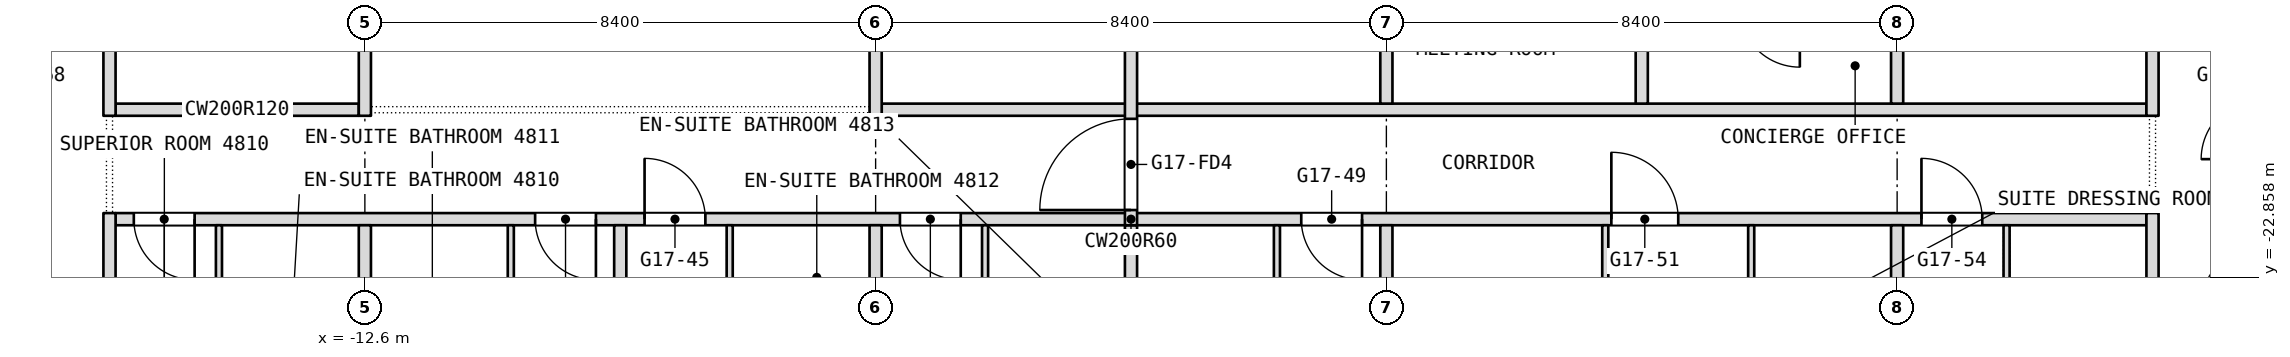
"""IFC4 building model, lengths in metres.
Left out: names, types, materials, properties, quantities, classifications, styles, units other than length and angle.
Written with IfcOpenShell. Run it as: python <this file> out.ifc"""

import sys

from ifc_helpers import new_model, si_unit, direction, frame, frame_2d, origin, place, context, subcontext, project, spatial, rectangle, extrude, element, fill, save


model = new_model("IFC4")
c1 = context("Model", 3, precision=1e-05, world=origin(), true_north=direction((0.0, 1.0)))
c2 = subcontext(c1, "Body", "Model", "MODEL_VIEW")
j1 = project(units=[si_unit("LENGTHUNIT", "METRE"), si_unit("PLANEANGLEUNIT", "RADIAN")], contexts=[c1])
p1 = place(None, origin())
s1 = spatial("IfcSite", under=j1, at=p1, CompositionType="ELEMENT")
p2 = place(p1, origin())
s2 = spatial("IfcBuilding", under=s1, at=p2, CompositionType="ELEMENT")
p3 = place(p2, frame((0.0, 0.0, 209.3)))
s3 = spatial("IfcBuildingStorey", under=s2, at=p3, CompositionType="ELEMENT", Elevation=209.3)
p4 = place(p3, frame((-16.7, -21.9, 0.0), z_axis=(0.0, 0.0, 1.0), x_axis=(1.0, 0.0, 0.0)))
e1 = element("IfcWall", 1, at=p4, inside=s3, PredefinedType="PARTITIONING", context=c2, shape_type="SweptSolid", body=[
    extrude(rectangle(XDim=33.4, YDim=0.2, at=frame_2d((16.7, 0.0))), origin(), (0.0, 0.0, 1.0), 3.34),
])
p5 = place(p4, frame((0.3, 0.0, 0.0)))
e2 = element("IfcOpeningElement", 2, at=p5, cuts=e1, PredefinedType="OPENING", context=c2, shape_type="SweptSolid", body=[
    extrude(rectangle(XDim=1.0, YDim=2.1, at=frame_2d((0.5, 1.05))), frame((0.0, 0.1, 0.0), z_axis=(0.0, -1.0, 0.0), x_axis=(1.0, 0.0, 0.0)), (0.0, 0.0, 1.0), 0.2),
])
p6 = place(p4, frame((6.9, 0.0, 0.0)))
e3 = element("IfcOpeningElement", 3, at=p6, cuts=e1, PredefinedType="OPENING", context=c2, shape_type="SweptSolid", body=[
    extrude(rectangle(XDim=1.0, YDim=2.1, at=frame_2d((0.5, 1.05))), frame((0.0, 0.1, 0.0), z_axis=(0.0, -1.0, 0.0), x_axis=(1.0, 0.0, 0.0)), (0.0, 0.0, 1.0), 0.2),
])
p7 = place(p4, frame((8.7, 0.0, 0.0)))
e4 = element("IfcOpeningElement", 4, at=p7, cuts=e1, PredefinedType="OPENING", context=c2, shape_type="SweptSolid", body=[
    extrude(rectangle(XDim=1.0, YDim=2.1, at=frame_2d((0.5, 1.05))), frame((0.0, 0.1, 0.0), z_axis=(0.0, -1.0, 0.0), x_axis=(1.0, 0.0, 0.0)), (0.0, 0.0, 1.0), 0.2),
])
p8 = place(p4, frame((12.9, 0.0, 0.0)))
e5 = element("IfcOpeningElement", 5, at=p8, cuts=e1, PredefinedType="OPENING", context=c2, shape_type="SweptSolid", body=[
    extrude(rectangle(XDim=1.0, YDim=2.1, at=frame_2d((0.5, 1.05))), frame((0.0, 0.1, 0.0), z_axis=(0.0, -1.0, 0.0), x_axis=(1.0, 0.0, 0.0)), (0.0, 0.0, 1.0), 0.2),
])
p9 = place(p4, frame((19.5, 0.0, 0.0)))
e6 = element("IfcOpeningElement", 6, at=p9, cuts=e1, PredefinedType="OPENING", context=c2, shape_type="SweptSolid", body=[
    extrude(rectangle(XDim=1.0, YDim=2.1, at=frame_2d((0.5, 1.05))), frame((0.0, 0.1, 0.0), z_axis=(0.0, -1.0, 0.0), x_axis=(1.0, 0.0, 0.0)), (0.0, 0.0, 1.0), 0.2),
])
p10 = place(p4, frame((24.6, 0.0, 0.0)))
e7 = element("IfcOpeningElement", 7, at=p10, cuts=e1, PredefinedType="OPENING", context=c2, shape_type="SweptSolid", body=[
    extrude(rectangle(XDim=1.1, YDim=2.1, at=frame_2d((0.55, 1.05))), frame((0.0, 0.1, 0.0), z_axis=(0.0, -1.0, 0.0), x_axis=(1.0, 0.0, 0.0)), (0.0, 0.0, 1.0), 0.2),
])
p11 = place(p4, frame((29.7, 0.0, 0.0)))
e8 = element("IfcOpeningElement", 8, at=p11, cuts=e1, PredefinedType="OPENING", context=c2, shape_type="SweptSolid", body=[
    extrude(rectangle(XDim=1.0, YDim=2.1, at=frame_2d((0.5, 1.05))), frame((0.0, 0.1, 0.0), z_axis=(0.0, -1.0, 0.0), x_axis=(1.0, 0.0, 0.0)), (0.0, 0.0, 1.0), 0.2),
])
p12 = place(p3, frame((-16.7, -20.1, 0.0), z_axis=(0.0, 0.0, 1.0), x_axis=(1.0, 0.0, 0.0)))
e9 = element("IfcWall", 9, at=p12, inside=s3, PredefinedType="PARTITIONING", context=c2, shape_type="SweptSolid", body=[
    extrude(rectangle(XDim=4.0, YDim=0.2, at=frame_2d((2.0, 0.0))), origin(), (0.0, 0.0, 1.0), 3.34),
])
p13 = place(p3, frame((-4.1, -20.1, 0.0), z_axis=(0.0, 0.0, 1.0), x_axis=(1.0, 0.0, 0.0)))
e10 = element("IfcWall", 10, at=p13, inside=s3, PredefinedType="PARTITIONING", context=c2, shape_type="SweptSolid", body=[
    extrude(rectangle(XDim=20.8, YDim=0.2, at=frame_2d((10.4, 0.0))), origin(), (0.0, 0.0, 1.0), 3.34),
])
p14 = place(p3, frame((16.8, -27.229, 0.0), z_axis=(0.0, 0.0, 1.0), x_axis=(0.0, 1.0, 0.0)))
e11 = element("IfcWall", 11, at=p14, inside=s3, PredefinedType="PARTITIONING", context=c2, shape_type="SweptSolid", body=[
    extrude(rectangle(XDim=5.429, YDim=0.2, at=frame_2d((2.714, 0.0))), origin(), (0.0, 0.0, 1.0), 3.34),
])
p15 = place(p3, frame((16.8, -20.2, 0.0), z_axis=(0.0, 0.0, 1.0), x_axis=(0.0, 1.0, 0.0)))
e12 = element("IfcWall", 12, at=p15, inside=s3, PredefinedType="PARTITIONING", context=c2, shape_type="SweptSolid", body=[
    extrude(rectangle(XDim=6.8, YDim=0.2, at=frame_2d((3.4, 0.0))), origin(), (0.0, 0.0, 1.0), 3.34),
])
p16 = place(p3, frame((14.4, -25.85, 0.0), z_axis=(0.0, 0.0, 1.0), x_axis=(0.0, 1.0, 0.0)))
e13 = element("IfcWall", 13, at=p16, inside=s3, PredefinedType="PARTITIONING", context=c2, shape_type="SweptSolid", body=[
    extrude(rectangle(XDim=3.85, YDim=0.1, at=frame_2d((1.925, 0.0))), origin(), (0.0, 0.0, 1.0), 3.34),
])
p17 = place(p3, frame((12.6, -28.343, 0.0), z_axis=(0.0, 0.0, 1.0), x_axis=(0.0, 1.0, 0.0)))
e14 = element("IfcWall", 14, at=p17, inside=s3, PredefinedType="PARTITIONING", context=c2, shape_type="SweptSolid", body=[
    extrude(rectangle(XDim=6.343, YDim=0.2, at=frame_2d((3.171, 0.0))), origin(), (0.0, 0.0, 1.0), 3.34),
])
p18 = place(p3, frame((12.6, -20.0, 0.0), z_axis=(0.0, 0.0, 1.0), x_axis=(0.0, 1.0, 0.0)))
e15 = element("IfcWall", 15, at=p18, inside=s3, PredefinedType="PARTITIONING", context=c2, shape_type="SweptSolid", body=[
    extrude(rectangle(XDim=1.5, YDim=0.2, at=frame_2d((0.75, 0.0))), origin(), (0.0, 0.0, 1.0), 3.34),
])
p19 = place(p3, frame((10.2, -25.55, 0.0), z_axis=(0.0, 0.0, 1.0), x_axis=(0.0, 1.0, 0.0)))
e16 = element("IfcWall", 16, at=p19, inside=s3, PredefinedType="PARTITIONING", context=c2, shape_type="SweptSolid", body=[
    extrude(rectangle(XDim=3.55, YDim=0.1, at=frame_2d((1.775, 0.0))), origin(), (0.0, 0.0, 1.0), 3.34),
])
p20 = place(p3, frame((8.4, -20.0, 0.0), z_axis=(0.0, 0.0, 1.0), x_axis=(0.0, 1.0, 0.0)))
e17 = element("IfcWall", 17, at=p20, inside=s3, PredefinedType="PARTITIONING", context=c2, shape_type="SweptSolid", body=[
    extrude(rectangle(XDim=1.5, YDim=0.2, at=frame_2d((0.75, 0.0))), origin(), (0.0, 0.0, 1.0), 3.34),
])
p21 = place(p3, frame((7.8, -25.45, 0.0), z_axis=(0.0, 0.0, 1.0), x_axis=(0.0, 1.0, 0.0)))
e18 = element("IfcWall", 18, at=p21, inside=s3, PredefinedType="PARTITIONING", context=c2, shape_type="SweptSolid", body=[
    extrude(rectangle(XDim=3.45, YDim=0.1, at=frame_2d((1.725, 0.0))), origin(), (0.0, 0.0, 1.0), 3.34),
])
p22 = place(p3, frame((4.2, -28.9, 0.0), z_axis=(0.0, 0.0, 1.0), x_axis=(0.0, 1.0, 0.0)))
e19 = element("IfcWall", 19, at=p22, inside=s3, PredefinedType="PARTITIONING", context=c2, shape_type="SweptSolid", body=[
    extrude(rectangle(XDim=6.9, YDim=0.2, at=frame_2d((3.45, 0.0))), origin(), (0.0, 0.0, 1.0), 3.34),
])
p23 = place(p3, frame((4.2, -20.0, 0.0), z_axis=(0.0, 0.0, 1.0), x_axis=(0.0, 1.0, 0.0)))
e20 = element("IfcWall", 20, at=p23, inside=s3, PredefinedType="PARTITIONING", context=c2, shape_type="SweptSolid", body=[
    extrude(rectangle(XDim=6.4, YDim=0.2, at=frame_2d((3.2, 0.0))), origin(), (0.0, 0.0, 1.0), 3.34),
])
p24 = place(p3, frame((2.4, -25.75, 0.0), z_axis=(0.0, 0.0, 1.0), x_axis=(0.0, 1.0, 0.0)))
e21 = element("IfcWall", 21, at=p24, inside=s3, PredefinedType="PARTITIONING", context=c2, shape_type="SweptSolid", body=[
    extrude(rectangle(XDim=3.75, YDim=0.1, at=frame_2d((1.875, 0.0))), origin(), (0.0, 0.0, 1.0), 3.34),
])
p25 = place(p3, frame((0.0, -28.9, 0.0), z_axis=(0.0, 0.0, 1.0), x_axis=(0.0, 1.0, 0.0)))
e22 = element("IfcWall", 22, at=p25, inside=s3, PredefinedType="PARTITIONING", context=c2, shape_type="SweptSolid", body=[
    extrude(rectangle(XDim=6.9, YDim=0.2, at=frame_2d((3.45, 0.0))), origin(), (0.0, 0.0, 1.0), 3.34),
])
p26 = place(p3, frame((0.0, -22.0, 0.0), z_axis=(0.0, 0.0, 1.0), x_axis=(0.0, 1.0, 0.0)))
e23 = element("IfcWall", 23, at=p26, inside=s3, PredefinedType="PARTITIONING", context=c2, shape_type="SweptSolid", body=[
    extrude(rectangle(XDim=8.4, YDim=0.2, at=frame_2d((4.2, 0.0))), origin(), (0.0, 0.0, 1.0), 3.34),
])
p27 = place(p26, frame((0.25, 0.0, 0.0)))
e24 = element("IfcOpeningElement", 24, at=p27, cuts=e23, PredefinedType="OPENING", context=c2, shape_type="SweptSolid", body=[
    extrude(rectangle(XDim=1.5, YDim=2.1, at=frame_2d((0.75, 1.05))), frame((0.0, 0.1, 0.0), z_axis=(0.0, -1.0, 0.0), x_axis=(1.0, 0.0, 0.0)), (0.0, 0.0, 1.0), 0.2),
])
p28 = place(p3, frame((-2.4, -25.35, 0.0), z_axis=(0.0, 0.0, 1.0), x_axis=(0.0, 1.0, 0.0)))
e25 = element("IfcWall", 25, at=p28, inside=s3, PredefinedType="PARTITIONING", context=c2, shape_type="SweptSolid", body=[
    extrude(rectangle(XDim=3.35, YDim=0.1, at=frame_2d((1.675, 0.0))), origin(), (0.0, 0.0, 1.0), 3.34),
])
p29 = place(p3, frame((-4.2, -28.9, 0.0), z_axis=(0.0, 0.0, 1.0), x_axis=(0.0, 1.0, 0.0)))
e26 = element("IfcWall", 26, at=p29, inside=s3, PredefinedType="PARTITIONING", context=c2, shape_type="SweptSolid", body=[
    extrude(rectangle(XDim=6.9, YDim=0.2, at=frame_2d((3.45, 0.0))), origin(), (0.0, 0.0, 1.0), 3.34),
])
p30 = place(p3, frame((-4.2, -20.2, 0.0), z_axis=(0.0, 0.0, 1.0), x_axis=(0.0, 1.0, 0.0)))
e27 = element("IfcWall", 27, at=p30, inside=s3, PredefinedType="PARTITIONING", context=c2, shape_type="SweptSolid", body=[
    extrude(rectangle(XDim=6.6, YDim=0.2, at=frame_2d((3.3, 0.0))), origin(), (0.0, 0.0, 1.0), 3.34),
])
p31 = place(p3, frame((-6.6, -24.75, 0.0), z_axis=(0.0, 0.0, 1.0), x_axis=(0.0, 1.0, 0.0)))
e28 = element("IfcWall", 28, at=p31, inside=s3, PredefinedType="PARTITIONING", context=c2, shape_type="SweptSolid", body=[
    extrude(rectangle(XDim=2.75, YDim=0.1, at=frame_2d((1.375, 0.0))), origin(), (0.0, 0.0, 1.0), 3.34),
])
p32 = place(p3, frame((-8.4, -28.9, 0.0), z_axis=(0.0, 0.0, 1.0), x_axis=(0.0, 1.0, 0.0)))
e29 = element("IfcWall", 29, at=p32, inside=s3, PredefinedType="PARTITIONING", context=c2, shape_type="SweptSolid", body=[
    extrude(rectangle(XDim=6.9, YDim=0.2, at=frame_2d((3.45, 0.0))), origin(), (0.0, 0.0, 1.0), 3.34),
])
p33 = place(p3, frame((-10.2, -24.85, 0.0), z_axis=(0.0, 0.0, 1.0), x_axis=(0.0, 1.0, 0.0)))
e30 = element("IfcWall", 30, at=p33, inside=s3, PredefinedType="PARTITIONING", context=c2, shape_type="SweptSolid", body=[
    extrude(rectangle(XDim=2.85, YDim=0.1, at=frame_2d((1.425, 0.0))), origin(), (0.0, 0.0, 1.0), 3.34),
])
p34 = place(p3, frame((-12.6, -28.343, 0.0), z_axis=(0.0, 0.0, 1.0), x_axis=(0.0, 1.0, 0.0)))
e31 = element("IfcWall", 31, at=p34, inside=s3, PredefinedType="PARTITIONING", context=c2, shape_type="SweptSolid", body=[
    extrude(rectangle(XDim=6.343, YDim=0.2, at=frame_2d((3.171, 0.0))), origin(), (0.0, 0.0, 1.0), 3.34),
])
p35 = place(p3, frame((-12.6, -20.2, 0.0), z_axis=(0.0, 0.0, 1.0), x_axis=(0.0, 1.0, 0.0)))
e32 = element("IfcWall", 32, at=p35, inside=s3, PredefinedType="PARTITIONING", context=c2, shape_type="SweptSolid", body=[
    extrude(rectangle(XDim=6.8, YDim=0.2, at=frame_2d((3.4, 0.0))), origin(), (0.0, 0.0, 1.0), 3.34),
])
p36 = place(p3, frame((-15.0, -25.85, 0.0), z_axis=(0.0, 0.0, 1.0), x_axis=(0.0, 1.0, 0.0)))
e33 = element("IfcWall", 33, at=p36, inside=s3, PredefinedType="PARTITIONING", context=c2, shape_type="SweptSolid", body=[
    extrude(rectangle(XDim=3.85, YDim=0.1, at=frame_2d((1.925, 0.0))), origin(), (0.0, 0.0, 1.0), 3.34),
])
p37 = place(p3, frame((-16.8, -27.229, 0.0), z_axis=(0.0, 0.0, 1.0), x_axis=(0.0, 1.0, 0.0)))
e34 = element("IfcWall", 34, at=p37, inside=s3, PredefinedType="PARTITIONING", context=c2, shape_type="SweptSolid", body=[
    extrude(rectangle(XDim=5.429, YDim=0.2, at=frame_2d((2.714, 0.0))), origin(), (0.0, 0.0, 1.0), 3.34),
])
p38 = place(p3, frame((-16.8, -20.2, 0.0), z_axis=(0.0, 0.0, 1.0), x_axis=(0.0, 1.0, 0.0)))
e35 = element("IfcWall", 35, at=p38, inside=s3, PredefinedType="PARTITIONING", context=c2, shape_type="SweptSolid", body=[
    extrude(rectangle(XDim=6.8, YDim=0.2, at=frame_2d((3.4, 0.0))), origin(), (0.0, 0.0, 1.0), 3.34),
])
p39 = place(p5, origin())
e36 = element("IfcDoor", 36, at=p39, inside=s3, OperationType="SINGLE_SWING_RIGHT", PredefinedType="DOOR", context=c2, shape_type="SweptSolid", body=[
    extrude(rectangle(XDim=1.0, YDim=2.1, at=frame_2d((0.5, 1.05))), frame((0.0, 0.025, 0.0), z_axis=(0.0, -1.0, 0.0), x_axis=(1.0, 0.0, 0.0)), (0.0, 0.0, 1.0), 0.05),
])
fill(e2, e36)
p40 = place(p6, origin())
e37 = element("IfcDoor", 37, at=p40, inside=s3, OperationType="SINGLE_SWING_LEFT", PredefinedType="DOOR", context=c2, shape_type="SweptSolid", body=[
    extrude(rectangle(XDim=1.0, YDim=2.1, at=frame_2d((0.5, 1.05))), frame((0.0, 0.025, 0.0), z_axis=(0.0, -1.0, 0.0), x_axis=(1.0, 0.0, 0.0)), (0.0, 0.0, 1.0), 0.05),
])
fill(e3, e37)
p41 = place(p7, origin())
e38 = element("IfcDoor", 38, at=p41, inside=s3, OperationType="SINGLE_SWING_LEFT", PredefinedType="DOOR", context=c2, shape_type="SweptSolid", body=[
    extrude(rectangle(XDim=1.0, YDim=2.1, at=frame_2d((0.5, 1.05))), frame((0.0, 0.025, 0.0), z_axis=(0.0, -1.0, 0.0), x_axis=(1.0, 0.0, 0.0)), (0.0, 0.0, 1.0), 0.05),
])
fill(e4, e38)
p42 = place(p8, origin())
e39 = element("IfcDoor", 39, at=p42, inside=s3, OperationType="SINGLE_SWING_LEFT", PredefinedType="DOOR", context=c2, shape_type="SweptSolid", body=[
    extrude(rectangle(XDim=1.0, YDim=2.1, at=frame_2d((0.5, 1.05))), frame((0.0, 0.025, 0.0), z_axis=(0.0, -1.0, 0.0), x_axis=(1.0, 0.0, 0.0)), (0.0, 0.0, 1.0), 0.05),
])
fill(e5, e39)
p43 = place(p9, origin())
e40 = element("IfcDoor", 40, at=p43, inside=s3, OperationType="SINGLE_SWING_LEFT", PredefinedType="DOOR", context=c2, shape_type="SweptSolid", body=[
    extrude(rectangle(XDim=1.0, YDim=2.1, at=frame_2d((0.5, 1.05))), frame((0.0, 0.025, 0.0), z_axis=(0.0, -1.0, 0.0), x_axis=(1.0, 0.0, 0.0)), (0.0, 0.0, 1.0), 0.05),
])
fill(e6, e40)
p44 = place(p10, origin())
e41 = element("IfcDoor", 41, at=p44, inside=s3, OperationType="SINGLE_SWING_RIGHT", PredefinedType="DOOR", context=c2, shape_type="SweptSolid", body=[
    extrude(rectangle(XDim=1.1, YDim=2.1, at=frame_2d((0.55, 1.05))), frame((0.0, 0.025, 0.0), z_axis=(0.0, -1.0, 0.0), x_axis=(1.0, 0.0, 0.0)), (0.0, 0.0, 1.0), 0.05),
])
fill(e7, e41)
p45 = place(p11, origin())
e42 = element("IfcDoor", 42, at=p45, inside=s3, OperationType="SINGLE_SWING_RIGHT", PredefinedType="DOOR", context=c2, shape_type="SweptSolid", body=[
    extrude(rectangle(XDim=1.0, YDim=2.1, at=frame_2d((0.5, 1.05))), frame((0.0, 0.025, 0.0), z_axis=(0.0, -1.0, 0.0), x_axis=(1.0, 0.0, 0.0)), (0.0, 0.0, 1.0), 0.05),
])
fill(e8, e42)
p46 = place(p27, origin())
e43 = element("IfcDoor", 43, at=p46, inside=s3, OperationType="DOUBLE_DOOR_DOUBLE_SWING", PredefinedType="DOOR", context=c2, shape_type="SweptSolid", body=[
    extrude(rectangle(XDim=1.5, YDim=2.1, at=frame_2d((0.75, 1.05))), frame((0.0, 0.025, 0.0), z_axis=(0.0, -1.0, 0.0), x_axis=(1.0, 0.0, 0.0)), (0.0, 0.0, 1.0), 0.05),
])
fill(e24, e43)
save(model, sys.argv[1])
